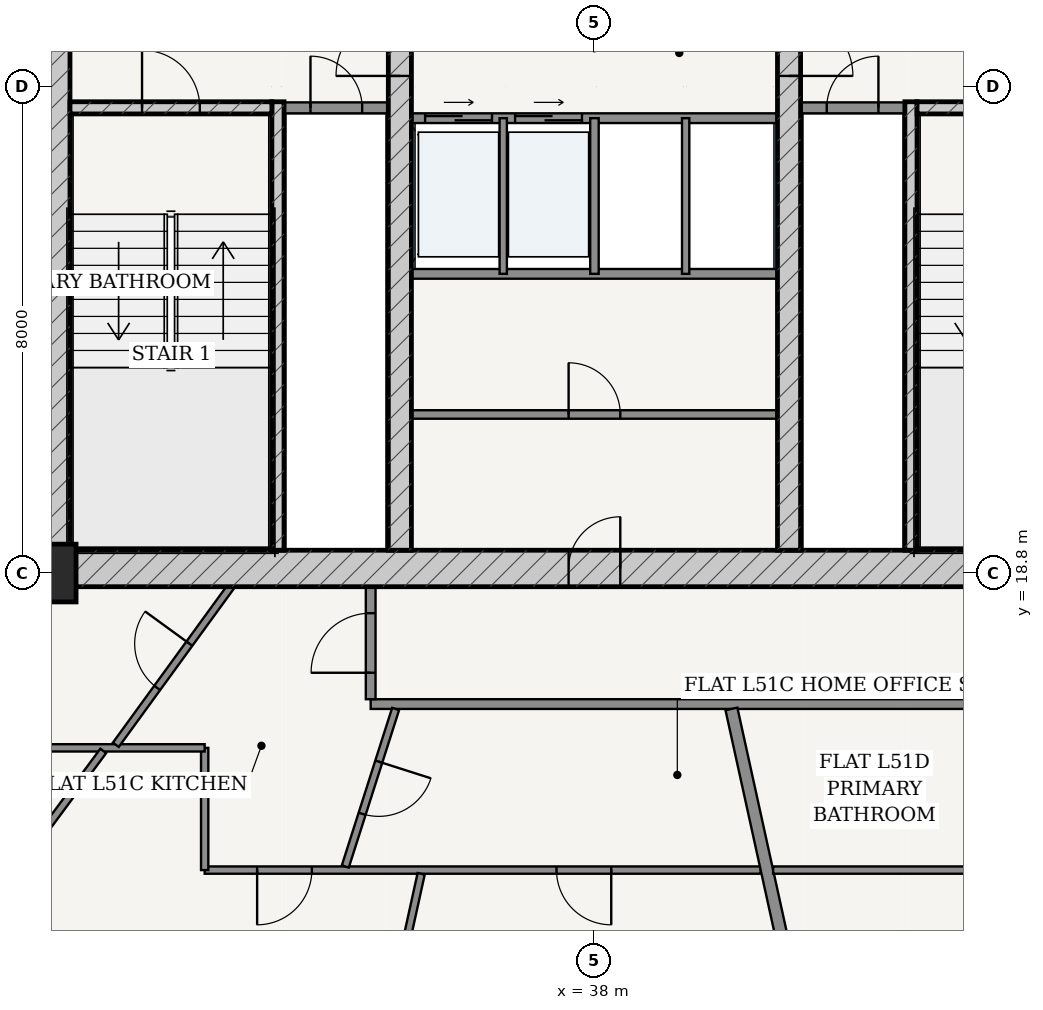
"""IFC4 building model, lengths in metres.
Left out: names, types, materials, properties, quantities, classifications, styles, units other than length and angle.
Written with IfcOpenShell. Run it as: python <this file> out.ifc"""

import sys

from ifc_helpers import new_model, si_unit, direction, frame, frame_2d, origin, origin_2d, place, context, subcontext, project, spatial, rectangle, extrude, source, transform, mapped, element, fill, save


model = new_model("IFC4")
c1 = context("Model", 3, precision=1e-05, world=origin(), true_north=direction((-0.2419218956, 0.970295726276)))
c2 = subcontext(c1, "Body", "Model", "MODEL_VIEW")
j1 = project(units=[si_unit("LENGTHUNIT", "METRE"), si_unit("PLANEANGLEUNIT", "RADIAN")], contexts=[c1])
p1 = place(None, origin())
s1 = spatial("IfcSite", under=j1, at=p1, CompositionType="ELEMENT")
p2 = place(p1, origin())
s2 = spatial("IfcBuilding", under=s1, at=p2, CompositionType="ELEMENT")
p3 = place(p2, frame((0.0, 0.0, 194.9)))
s3 = spatial("IfcBuildingStorey", under=s2, at=p3, CompositionType="ELEMENT", Elevation=194.9)
p4 = place(p3, frame((29.0, 18.8, 0.0), z_axis=(0.0, 0.0, 1.0), x_axis=(1.0, 0.0, 0.0)))
e1 = element("IfcColumn", 1, at=p4, inside=s3, PredefinedType="COLUMN", context=c2, shape_type="SweptSolid", body=[
    extrude(rectangle(XDim=0.95, YDim=0.95, at=origin_2d()), origin(), (0.0, 0.0, 1.0), 3.7),
])
p5 = place(p3, frame((28.775, 18.875, 0.0), z_axis=(0.0, 0.0, 1.0), x_axis=(1.0, 0.0, 0.0)))
e2 = element("IfcWall", 2, at=p5, inside=s3, PredefinedType="SHEAR", context=c2, shape_type="SweptSolid", body=[
    extrude(rectangle(XDim=18.45, YDim=0.6, at=frame_2d((9.225, 0.0))), origin(), (0.0, 0.0, 1.0), 3.435),
])
p6 = place(p5, frame((8.8, 0.0, 0.0)))
e3 = element("IfcOpeningElement", 3, at=p6, cuts=e2, PredefinedType="OPENING", context=c2, shape_type="SweptSolid", body=[
    extrude(rectangle(XDim=0.85, YDim=2.1, at=frame_2d((0.425, 1.05))), frame((0.0, 0.31, 0.0), z_axis=(0.0, -1.0, 0.0), x_axis=(1.0, 0.0, 0.0)), (0.0, 0.0, 1.0), 0.62),
])
p7 = place(p3, frame((29.075, 19.175, 0.0), z_axis=(0.0, 0.0, 1.0), x_axis=(0.0, 1.0, 0.0)))
e4 = element("IfcWall", 4, at=p7, inside=s3, PredefinedType="SHEAR", context=c2, shape_type="SweptSolid", body=[
    extrude(rectangle(XDim=15.25, YDim=0.6, at=frame_2d((7.625, 0.0))), origin(), (0.0, 0.0, 1.0), 3.435),
])
p8 = place(p7, frame((9.875, 0.0, 0.0)))
e5 = element("IfcOpeningElement", 5, at=p8, cuts=e4, PredefinedType="OPENING", context=c2, shape_type="SweptSolid", body=[
    extrude(rectangle(XDim=1.5, YDim=2.2, at=frame_2d((0.75, 1.1))), frame((0.0, 0.31, 0.0), z_axis=(0.0, -1.0, 0.0), x_axis=(1.0, 0.0, 0.0)), (0.0, 0.0, 1.0), 0.62),
])
p9 = place(p3, frame((32.795, 19.175, 0.0), z_axis=(0.0, 0.0, 1.0), x_axis=(0.0, 1.0, 0.0)))
e6 = element("IfcWall", 6, at=p9, inside=s3, PredefinedType="SOLIDWALL", context=c2, shape_type="SweptSolid", body=[
    extrude(rectangle(XDim=7.375, YDim=0.2, at=frame_2d((3.688, 0.0))), origin(), (0.0, 0.0, 1.0), 3.435),
])
p10 = place(p3, frame((29.375, 26.45, 0.0), z_axis=(0.0, 0.0, 1.0), x_axis=(1.0, 0.0, 0.0)))
e7 = element("IfcWall", 7, at=p10, inside=s3, PredefinedType="SOLIDWALL", context=c2, shape_type="SweptSolid", body=[
    extrude(rectangle(XDim=3.32, YDim=0.2, at=frame_2d((1.66, 0.0))), origin(), (0.0, 0.0, 1.0), 3.435),
])
p11 = place(p10, frame((1.185, 0.0, 0.0)))
e8 = element("IfcOpeningElement", 8, at=p11, cuts=e7, PredefinedType="OPENING", context=c2, shape_type="SweptSolid", body=[
    extrude(rectangle(XDim=0.95, YDim=2.15, at=frame_2d((0.475, 1.075))), frame((0.0, 0.11, 0.0), z_axis=(0.0, -1.0, 0.0), x_axis=(1.0, 0.0, 0.0)), (0.0, 0.0, 1.0), 0.22),
])
p12 = place(p3, frame((43.205, 19.175, 0.0), z_axis=(0.0, 0.0, 1.0), x_axis=(0.0, 1.0, 0.0)))
e9 = element("IfcWall", 9, at=p12, inside=s3, PredefinedType="SOLIDWALL", context=c2, shape_type="SweptSolid", body=[
    extrude(rectangle(XDim=7.375, YDim=0.2, at=frame_2d((3.688, 0.0))), origin(), (0.0, 0.0, 1.0), 3.435),
])
p13 = place(p3, frame((43.305, 26.45, 0.0), z_axis=(0.0, 0.0, 1.0), x_axis=(1.0, 0.0, 0.0)))
e10 = element("IfcWall", 10, at=p13, inside=s3, PredefinedType="SOLIDWALL", context=c2, shape_type="SweptSolid", body=[
    extrude(rectangle(XDim=3.32, YDim=0.2, at=frame_2d((1.66, 0.0))), origin(), (0.0, 0.0, 1.0), 3.435),
])
p14 = place(p13, frame((1.185, 0.0, 0.0)))
e11 = element("IfcOpeningElement", 11, at=p14, cuts=e10, PredefinedType="OPENING", context=c2, shape_type="SweptSolid", body=[
    extrude(rectangle(XDim=0.95, YDim=2.15, at=frame_2d((0.475, 1.075))), frame((0.0, 0.11, 0.0), z_axis=(0.0, -1.0, 0.0), x_axis=(1.0, 0.0, 0.0)), (0.0, 0.0, 1.0), 0.22),
])
p15 = place(p3, frame((34.8, 19.175, 0.0), z_axis=(0.0, 0.0, 1.0), x_axis=(0.0, 1.0, 0.0)))
e12 = element("IfcWall", 12, at=p15, inside=s3, PredefinedType="SHEAR", context=c2, shape_type="SweptSolid", body=[
    extrude(rectangle(XDim=15.25, YDim=0.38, at=frame_2d((7.625, 0.0))), origin(), (0.0, 0.0, 1.0), 3.435),
])
p16 = place(p15, frame((7.8, 0.0, 0.0)))
e13 = element("IfcOpeningElement", 13, at=p16, cuts=e12, PredefinedType="OPENING", context=c2, shape_type="SweptSolid", body=[
    extrude(rectangle(XDim=1.05, YDim=2.15, at=frame_2d((0.525, 1.075))), frame((0.0, 0.2, 0.0), z_axis=(0.0, -1.0, 0.0), x_axis=(1.0, 0.0, 0.0)), (0.0, 0.0, 1.0), 0.4),
])
p17 = place(p3, frame((41.2, 19.175, 0.0), z_axis=(0.0, 0.0, 1.0), x_axis=(0.0, 1.0, 0.0)))
e14 = element("IfcWall", 14, at=p17, inside=s3, PredefinedType="SHEAR", context=c2, shape_type="SweptSolid", body=[
    extrude(rectangle(XDim=15.25, YDim=0.38, at=frame_2d((7.625, 0.0))), origin(), (0.0, 0.0, 1.0), 3.435),
])
p18 = place(p17, frame((7.8, 0.0, 0.0)))
e15 = element("IfcOpeningElement", 15, at=p18, cuts=e14, PredefinedType="OPENING", context=c2, shape_type="SweptSolid", body=[
    extrude(rectangle(XDim=1.05, YDim=2.15, at=frame_2d((0.525, 1.075))), frame((0.0, 0.2, 0.0), z_axis=(0.0, -1.0, 0.0), x_axis=(1.0, 0.0, 0.0)), (0.0, 0.0, 1.0), 0.4),
])
p19 = place(p3, frame((32.9, 26.45, 0.0), z_axis=(0.0, 0.0, 1.0), x_axis=(1.0, 0.0, 0.0)))
e16 = element("IfcWall", 16, at=p19, inside=s3, PredefinedType="PARTITIONING", context=c2, shape_type="SweptSolid", body=[
    extrude(rectangle(XDim=1.71, YDim=0.18, at=frame_2d((0.855, 0.0))), origin(), (0.0, 0.0, 1.0), 3.435),
])
p20 = place(p19, frame((0.43, 0.0, 0.0)))
e17 = element("IfcOpeningElement", 17, at=p20, cuts=e16, PredefinedType="OPENING", context=c2, shape_type="SweptSolid", body=[
    extrude(rectangle(XDim=0.85, YDim=2.1, at=frame_2d((0.425, 1.05))), frame((0.0, 0.1, 0.0), z_axis=(0.0, -1.0, 0.0), x_axis=(1.0, 0.0, 0.0)), (0.0, 0.0, 1.0), 0.2),
])
p21 = place(p3, frame((41.39, 26.45, 0.0), z_axis=(0.0, 0.0, 1.0), x_axis=(1.0, 0.0, 0.0)))
e18 = element("IfcWall", 18, at=p21, inside=s3, PredefinedType="PARTITIONING", context=c2, shape_type="SweptSolid", body=[
    extrude(rectangle(XDim=1.71, YDim=0.18, at=frame_2d((0.855, 0.0))), origin(), (0.0, 0.0, 1.0), 3.435),
])
p22 = place(p21, frame((0.43, 0.0, 0.0)))
e19 = element("IfcOpeningElement", 19, at=p22, cuts=e18, PredefinedType="OPENING", context=c2, shape_type="SweptSolid", body=[
    extrude(rectangle(XDim=0.85, YDim=2.1, at=frame_2d((0.425, 1.05))), frame((0.0, 0.1, 0.0), z_axis=(0.0, -1.0, 0.0), x_axis=(1.0, 0.0, 0.0)), (0.0, 0.0, 1.0), 0.2),
])
p23 = place(p3, frame((34.99, 26.28, 0.0), z_axis=(0.0, 0.0, 1.0), x_axis=(1.0, 0.0, 0.0)))
e20 = element("IfcWall", 20, at=p23, inside=s3, PredefinedType="PARTITIONING", context=c2, shape_type="SweptSolid", body=[
    extrude(rectangle(XDim=6.02, YDim=0.16, at=frame_2d((3.01, 0.0))), origin(), (0.0, 0.0, 1.0), 3.435),
])
p24 = place(p23, frame((0.225, 0.0, 0.0)))
e21 = element("IfcOpeningElement", 21, at=p24, cuts=e20, PredefinedType="OPENING", context=c2, shape_type="SweptSolid", body=[
    extrude(rectangle(XDim=1.1, YDim=2.2, at=frame_2d((0.55, 1.1))), frame((0.0, 0.09, 0.0), z_axis=(0.0, -1.0, 0.0), x_axis=(1.0, 0.0, 0.0)), (0.0, 0.0, 1.0), 0.18),
])
p25 = place(p23, frame((1.705, 0.0, 0.0)))
e22 = element("IfcOpeningElement", 22, at=p25, cuts=e20, PredefinedType="OPENING", context=c2, shape_type="SweptSolid", body=[
    extrude(rectangle(XDim=1.1, YDim=2.2, at=frame_2d((0.55, 1.1))), frame((0.0, 0.09, 0.0), z_axis=(0.0, -1.0, 0.0), x_axis=(1.0, 0.0, 0.0)), (0.0, 0.0, 1.0), 0.18),
])
p26 = place(p3, frame((34.99, 23.72, 0.0), z_axis=(0.0, 0.0, 1.0), x_axis=(1.0, 0.0, 0.0)))
e23 = element("IfcWall", 23, at=p26, inside=s3, PredefinedType="PARTITIONING", context=c2, shape_type="SweptSolid", body=[
    extrude(rectangle(XDim=6.02, YDim=0.16, at=frame_2d((3.01, 0.0))), origin(), (0.0, 0.0, 1.0), 3.435),
])
p27 = place(p3, frame((36.5, 23.72, 0.0), z_axis=(0.0, 0.0, 1.0), x_axis=(0.0, 1.0, 0.0)))
e24 = element("IfcWall", 24, at=p27, inside=s3, PredefinedType="PARTITIONING", context=c2, shape_type="SweptSolid", body=[
    extrude(rectangle(XDim=2.56, YDim=0.12, at=frame_2d((1.28, 0.0))), origin(), (0.0, 0.0, 1.0), 3.435),
])
p28 = place(p3, frame((38.0, 23.72, 0.0), z_axis=(0.0, 0.0, 1.0), x_axis=(0.0, 1.0, 0.0)))
e25 = element("IfcWall", 25, at=p28, inside=s3, PredefinedType="PARTITIONING", context=c2, shape_type="SweptSolid", body=[
    extrude(rectangle(XDim=2.56, YDim=0.14, at=frame_2d((1.28, 0.0))), origin(), (0.0, 0.0, 1.0), 3.435),
])
p29 = place(p3, frame((39.5, 23.72, 0.0), z_axis=(0.0, 0.0, 1.0), x_axis=(0.0, 1.0, 0.0)))
e26 = element("IfcWall", 26, at=p29, inside=s3, PredefinedType="PARTITIONING", context=c2, shape_type="SweptSolid", body=[
    extrude(rectangle(XDim=2.56, YDim=0.12, at=frame_2d((1.28, 0.0))), origin(), (0.0, 0.0, 1.0), 3.435),
])
p30 = place(p3, frame((34.99, 21.407, 0.0), z_axis=(0.0, 0.0, 1.0), x_axis=(1.0, 0.0, 0.0)))
e27 = element("IfcWall", 27, at=p30, inside=s3, PredefinedType="PARTITIONING", context=c2, shape_type="SweptSolid", body=[
    extrude(rectangle(XDim=6.02, YDim=0.14, at=frame_2d((3.01, 0.0))), origin(), (0.0, 0.0, 1.0), 3.435),
])
p31 = place(p30, frame((2.585, 0.0, 0.0)))
e28 = element("IfcOpeningElement", 28, at=p31, cuts=e27, PredefinedType="OPENING", context=c2, shape_type="SweptSolid", body=[
    extrude(rectangle(XDim=0.85, YDim=2.1, at=frame_2d((0.425, 1.05))), frame((0.0, 0.08, 0.0), z_axis=(0.0, -1.0, 0.0), x_axis=(1.0, 0.0, 0.0)), (0.0, 0.0, 1.0), 0.16),
])
p32 = place(p3, frame((34.32, 16.645, 0.0), z_axis=(0.0, 0.0, 1.0), x_axis=(1.0, 0.0, 0.0)))
e29 = element("IfcWall", 29, at=p32, inside=s3, PredefinedType="PARTITIONING", context=c2, shape_type="SweptSolid", body=[
    extrude(rectangle(XDim=14.835, YDim=0.16, at=frame_2d((7.417, 0.0))), origin(), (0.0, 0.0, 1.0), 2.951),
])
p33 = place(p32, frame((11.961, 0.0, 0.0)))
e30 = element("IfcOpeningElement", 30, at=p33, cuts=e29, PredefinedType="OPENING", context=c2, shape_type="SweptSolid", body=[
    extrude(rectangle(XDim=0.98, YDim=2.2, at=frame_2d((0.49, 1.1))), frame((0.0, 0.09, 0.0), z_axis=(0.0, -1.0, 0.0), x_axis=(1.0, 0.0, 0.0)), (0.0, 0.0, 1.0), 0.18),
])
p34 = place(p3, frame((34.32, 16.725, 0.0), z_axis=(0.0, 0.0, 1.0), x_axis=(0.0, 1.0, 0.0)))
e31 = element("IfcWall", 31, at=p34, inside=s3, PredefinedType="PARTITIONING", context=c2, shape_type="SweptSolid", body=[
    extrude(rectangle(XDim=1.85, YDim=0.16, at=frame_2d((0.925, 0.0))), origin(), (0.0, 0.0, 1.0), 3.435),
])
p35 = place(p34, frame((0.435, 0.0, 0.0)))
e32 = element("IfcOpeningElement", 32, at=p35, cuts=e31, PredefinedType="OPENING", context=c2, shape_type="SweptSolid", body=[
    extrude(rectangle(XDim=0.98, YDim=2.2, at=frame_2d((0.49, 1.1))), frame((0.0, 0.09, 0.0), z_axis=(0.0, -1.0, 0.0), x_axis=(1.0, 0.0, 0.0)), (0.0, 0.0, 1.0), 0.18),
])
p36 = place(p3, frame((40.734, 13.915, 0.0), z_axis=(0.0, 0.0, 1.0), x_axis=(-1.0, 0.0, 0.0)))
e33 = element("IfcWall", 33, at=p36, inside=s3, PredefinedType="PARTITIONING", context=c2, shape_type="SweptSolid", body=[
    extrude(rectangle(XDim=9.144, YDim=0.12, at=frame_2d((4.572, 0.0))), origin(), (0.0, 0.0, 1.0), 2.951),
])
p37 = place(p36, frame((7.381, 0.0, 0.0)))
e34 = element("IfcOpeningElement", 34, at=p37, cuts=e33, PredefinedType="OPENING", context=c2, shape_type="SweptSolid", body=[
    extrude(rectangle(XDim=0.9, YDim=2.15, at=frame_2d((0.45, 1.075))), frame((0.0, 0.07, 0.0), z_axis=(0.0, -1.0, 0.0), x_axis=(1.0, 0.0, 0.0)), (0.0, 0.0, 1.0), 0.14),
])
p38 = place(p36, frame((2.458, 0.0, 0.0)))
e35 = element("IfcOpeningElement", 35, at=p38, cuts=e33, PredefinedType="OPENING", context=c2, shape_type="SweptSolid", body=[
    extrude(rectangle(XDim=0.9, YDim=2.15, at=frame_2d((0.45, 1.075))), frame((0.0, 0.07, 0.0), z_axis=(0.0, -1.0, 0.0), x_axis=(1.0, 0.0, 0.0)), (0.0, 0.0, 1.0), 0.14),
])
p39 = place(p3, frame((31.59, 13.915, 0.0), z_axis=(0.0, 0.0, 1.0), x_axis=(0.0, 1.0, 0.0)))
e36 = element("IfcWall", 36, at=p39, inside=s3, PredefinedType="PARTITIONING", context=c2, shape_type="SweptSolid", body=[
    extrude(rectangle(XDim=2.01, YDim=0.12, at=frame_2d((1.005, 0.0))), origin(), (0.0, 0.0, 1.0), 3.11),
])
p40 = place(p3, frame((31.59, 15.925, 0.0), z_axis=(0.0, 0.0, 1.0), x_axis=(-1.0, 0.0, 0.0)))
e37 = element("IfcWall", 37, at=p40, inside=s3, PredefinedType="PARTITIONING", context=c2, shape_type="SweptSolid", body=[
    extrude(rectangle(XDim=5.465, YDim=0.12, at=frame_2d((2.732, 0.0))), origin(), (0.0, 0.0, 1.0), 2.951),
])
p41 = place(p3, frame((29.922, 15.875, 0.0), z_axis=(0.0, 0.0, 1.0), x_axis=(-0.594524636617, -0.804077394568, 0.0)))
e38 = element("IfcWall", 38, at=p41, inside=s3, PredefinedType="PARTITIONING", context=c2, shape_type="SweptSolid", body=[
    extrude(rectangle(XDim=6.68, YDim=0.12, at=frame_2d((3.34, 0.0))), origin(), (0.0, 0.0, 1.0), 2.951),
])
p42 = place(p3, frame((35.15, 13.854, 0.0), z_axis=(0.0, 0.0, 1.0), x_axis=(-0.214942949264, -0.976626606519, 0.0)))
e39 = element("IfcWall", 39, at=p42, inside=s3, PredefinedType="PARTITIONING", context=c2, shape_type="SweptSolid", body=[
    extrude(rectangle(XDim=6.427, YDim=0.12, at=frame_2d((3.213, 0.0))), origin(), (0.0, 0.0, 1.0), 2.951),
])
p43 = place(p3, frame((32.019, 18.575, 0.0), z_axis=(0.0, 0.0, 1.0), x_axis=(-0.588135570825, -0.808762357143, 0.0)))
e40 = element("IfcWall", 40, at=p43, inside=s3, PredefinedType="PARTITIONING", context=c2, shape_type="SweptSolid", body=[
    extrude(rectangle(XDim=3.215, YDim=0.12, at=frame_2d((1.607, 0.0))), origin(), (0.0, 0.0, 1.0), 3.435),
])
p44 = place(p43, frame((1.157, 0.0, 0.0)))
e41 = element("IfcOpeningElement", 41, at=p44, cuts=e40, PredefinedType="OPENING", context=c2, shape_type="SweptSolid", body=[
    extrude(rectangle(XDim=0.9, YDim=2.15, at=frame_2d((0.45, 1.075))), frame((0.0, 0.07, 0.0), z_axis=(0.0, -1.0, 0.0), x_axis=(1.0, 0.0, 0.0)), (0.0, 0.0, 1.0), 0.14),
])
p45 = place(p3, frame((34.73, 16.565, 0.0), z_axis=(0.0, 0.0, 1.0), x_axis=(-0.304300161081, -0.952576197459, 0.0)))
e42 = element("IfcWall", 42, at=p45, inside=s3, PredefinedType="PARTITIONING", context=c2, shape_type="SweptSolid", body=[
    extrude(rectangle(XDim=2.72, YDim=0.12, at=frame_2d((1.36, 0.0))), origin(), (0.0, 0.0, 1.0), 3.11),
])
p46 = place(p45, frame((0.91, 0.0, 0.0)))
e43 = element("IfcOpeningElement", 43, at=p46, cuts=e42, PredefinedType="OPENING", context=c2, shape_type="SweptSolid", body=[
    extrude(rectangle(XDim=0.9, YDim=2.15, at=frame_2d((0.45, 1.075))), frame((0.0, 0.07, 0.0), z_axis=(0.0, -1.0, 0.0), x_axis=(1.0, 0.0, 0.0)), (0.0, 0.0, 1.0), 0.14),
])
p47 = place(p3, frame((40.253, 16.565, 0.0), z_axis=(0.0, 0.0, 1.0), x_axis=(0.214957946814, -0.976623305631, 0.0)))
e44 = element("IfcWall", 44, at=p47, inside=s3, PredefinedType="PARTITIONING", context=c2, shape_type="SweptSolid", body=[
    extrude(rectangle(XDim=9.202, YDim=0.2, at=frame_2d((4.601, 0.0))), origin(), (0.0, 0.0, 1.0), 2.951),
])
p48 = place(p3, frame((51.885, 13.915, 0.0), z_axis=(0.0, 0.0, 1.0), x_axis=(-1.0, 0.0, 0.0)))
e45 = element("IfcWall", 45, at=p48, inside=s3, PredefinedType="PARTITIONING", context=c2, shape_type="SweptSolid", body=[
    extrude(rectangle(XDim=10.947, YDim=0.12, at=frame_2d((5.473, 0.0))), origin(), (0.0, 0.0, 1.0), 2.951),
])
p49 = place(p48, frame((2.486, 0.0, 0.0)))
e46 = element("IfcOpeningElement", 46, at=p49, cuts=e45, PredefinedType="OPENING", context=c2, shape_type="SweptSolid", body=[
    extrude(rectangle(XDim=0.9, YDim=2.15, at=frame_2d((0.45, 1.075))), frame((0.0, 0.07, 0.0), z_axis=(0.0, -1.0, 0.0), x_axis=(1.0, 0.0, 0.0)), (0.0, 0.0, 1.0), 0.14),
])
m1 = source(origin(), c2, "Body", "SweptSolid", [
    extrude(rectangle(XDim=1.05, YDim=2.15, at=frame_2d((0.525, 1.075))), frame((0.0, 0.025, 0.0), z_axis=(0.0, -1.0, 0.0), x_axis=(1.0, 0.0, 0.0)), (0.0, 0.0, 1.0), 0.05),
])
p50 = place(p16, origin())
e47 = element("IfcDoor", 47, at=p50, inside=s3, OperationType="SINGLE_SWING_LEFT", PredefinedType="DOOR", context=c2, shape_type="MappedRepresentation", body=[
    mapped(m1, transform((0.0, 0.0, 0.0), scale=1.0)),
])
fill(e13, e47)
p51 = place(p18, frame((1.05, 0.0, 0.0), z_axis=(0.0, 0.0, 1.0), x_axis=(-1.0, 0.0, 0.0)))
e48 = element("IfcDoor", 48, at=p51, inside=s3, OperationType="SINGLE_SWING_RIGHT", PredefinedType="DOOR", context=c2, shape_type="MappedRepresentation", body=[
    mapped(m1, transform((0.0, 0.0, 0.0), scale=1.0)),
])
fill(e15, e48)
m2 = source(origin(), c2, "Body", "SweptSolid", [
    extrude(rectangle(XDim=0.95, YDim=2.15, at=frame_2d((0.475, 1.075))), frame((0.0, 0.025, 0.0), z_axis=(0.0, -1.0, 0.0), x_axis=(1.0, 0.0, 0.0)), (0.0, 0.0, 1.0), 0.05),
])
p52 = place(p11, origin())
e49 = element("IfcDoor", 49, at=p52, inside=s3, OperationType="SINGLE_SWING_LEFT", PredefinedType="DOOR", context=c2, shape_type="MappedRepresentation", body=[
    mapped(m2, transform((0.0, 0.0, 0.0), scale=1.0)),
])
fill(e8, e49)
m3 = source(origin(), c2, "Body", "SweptSolid", [
    extrude(rectangle(XDim=0.85, YDim=2.1, at=frame_2d((0.425, 1.05))), frame((0.0, 0.025, 0.0), z_axis=(0.0, -1.0, 0.0), x_axis=(1.0, 0.0, 0.0)), (0.0, 0.0, 1.0), 0.05),
])
p53 = place(p20, origin())
e50 = element("IfcDoor", 50, at=p53, inside=s3, OperationType="SINGLE_SWING_LEFT", PredefinedType="DOOR", context=c2, shape_type="MappedRepresentation", body=[
    mapped(m3, transform((0.0, 0.0, 0.0), scale=1.0)),
])
fill(e17, e50)
p54 = place(p22, origin())
e51 = element("IfcDoor", 51, at=p54, inside=s3, OperationType="SINGLE_SWING_RIGHT", PredefinedType="DOOR", context=c2, shape_type="MappedRepresentation", body=[
    mapped(m3, transform((0.0, 0.0, 0.0), scale=1.0)),
])
fill(e19, e51)
p55 = place(p6, origin())
e52 = element("IfcDoor", 52, at=p55, inside=s3, OperationType="SINGLE_SWING_RIGHT", PredefinedType="DOOR", context=c2, shape_type="MappedRepresentation", body=[
    mapped(m3, transform((0.0, 0.0, 0.0), scale=1.0)),
])
fill(e3, e52)
p56 = place(p31, origin())
e53 = element("IfcDoor", 53, at=p56, inside=s3, OperationType="SINGLE_SWING_LEFT", PredefinedType="DOOR", context=c2, shape_type="MappedRepresentation", body=[
    mapped(m3, transform((0.0, 0.0, 0.0), scale=1.0)),
])
fill(e28, e53)
m4 = source(origin(), c2, "Body", "SweptSolid", [
    extrude(rectangle(XDim=1.1, YDim=2.2, at=frame_2d((0.55, 1.1))), frame((0.0, 0.025, 0.0), z_axis=(0.0, -1.0, 0.0), x_axis=(1.0, 0.0, 0.0)), (0.0, 0.0, 1.0), 0.05),
])
p57 = place(p24, origin())
e54 = element("IfcDoor", 54, at=p57, inside=s3, OperationType="DOUBLE_DOOR_SLIDING", PredefinedType="DOOR", context=c2, shape_type="MappedRepresentation", body=[
    mapped(m4, transform((0.0, 0.0, 0.0), scale=1.0)),
])
fill(e21, e54)
p58 = place(p25, origin())
e55 = element("IfcDoor", 55, at=p58, inside=s3, OperationType="DOUBLE_DOOR_SLIDING", PredefinedType="DOOR", context=c2, shape_type="MappedRepresentation", body=[
    mapped(m4, transform((0.0, 0.0, 0.0), scale=1.0)),
])
fill(e22, e55)
m5 = source(origin(), c2, "Body", "SweptSolid", [
    extrude(rectangle(XDim=0.98, YDim=2.2, at=frame_2d((0.49, 1.1))), frame((0.0, 0.025, 0.0), z_axis=(0.0, -1.0, 0.0), x_axis=(1.0, 0.0, 0.0)), (0.0, 0.0, 1.0), 0.05),
])
p59 = place(p35, origin())
e56 = element("IfcDoor", 56, at=p59, inside=s3, OperationType="SINGLE_SWING_LEFT", PredefinedType="DOOR", context=c2, shape_type="MappedRepresentation", body=[
    mapped(m5, transform((0.0, 0.0, 0.0), scale=1.0)),
])
fill(e32, e56)
m6 = source(origin(), c2, "Body", "SweptSolid", [
    extrude(rectangle(XDim=0.9, YDim=2.15, at=frame_2d((0.45, 1.075))), frame((0.0, 0.025, 0.0), z_axis=(0.0, -1.0, 0.0), x_axis=(1.0, 0.0, 0.0)), (0.0, 0.0, 1.0), 0.05),
])
p60 = place(p44, frame((0.9, 0.0, 0.0), z_axis=(0.0, 0.0, 1.0), x_axis=(-1.0, 0.0, 0.0)))
e57 = element("IfcDoor", 57, at=p60, inside=s3, OperationType="SINGLE_SWING_RIGHT", PredefinedType="DOOR", context=c2, shape_type="MappedRepresentation", body=[
    mapped(m6, transform((0.0, 0.0, 0.0), scale=1.0)),
])
fill(e41, e57)
p61 = place(p46, origin())
e58 = element("IfcDoor", 58, at=p61, inside=s3, OperationType="SINGLE_SWING_LEFT", PredefinedType="DOOR", context=c2, shape_type="MappedRepresentation", body=[
    mapped(m6, transform((0.0, 0.0, 0.0), scale=1.0)),
])
fill(e43, e58)
p62 = place(p37, origin())
e59 = element("IfcDoor", 59, at=p62, inside=s3, OperationType="SINGLE_SWING_RIGHT", PredefinedType="DOOR", context=c2, shape_type="MappedRepresentation", body=[
    mapped(m6, transform((0.0, 0.0, 0.0), scale=1.0)),
])
fill(e34, e59)
p63 = place(p38, origin())
e60 = element("IfcDoor", 60, at=p63, inside=s3, OperationType="SINGLE_SWING_LEFT", PredefinedType="DOOR", context=c2, shape_type="MappedRepresentation", body=[
    mapped(m6, transform((0.0, 0.0, 0.0), scale=1.0)),
])
fill(e35, e60)
save(model, sys.argv[1])
